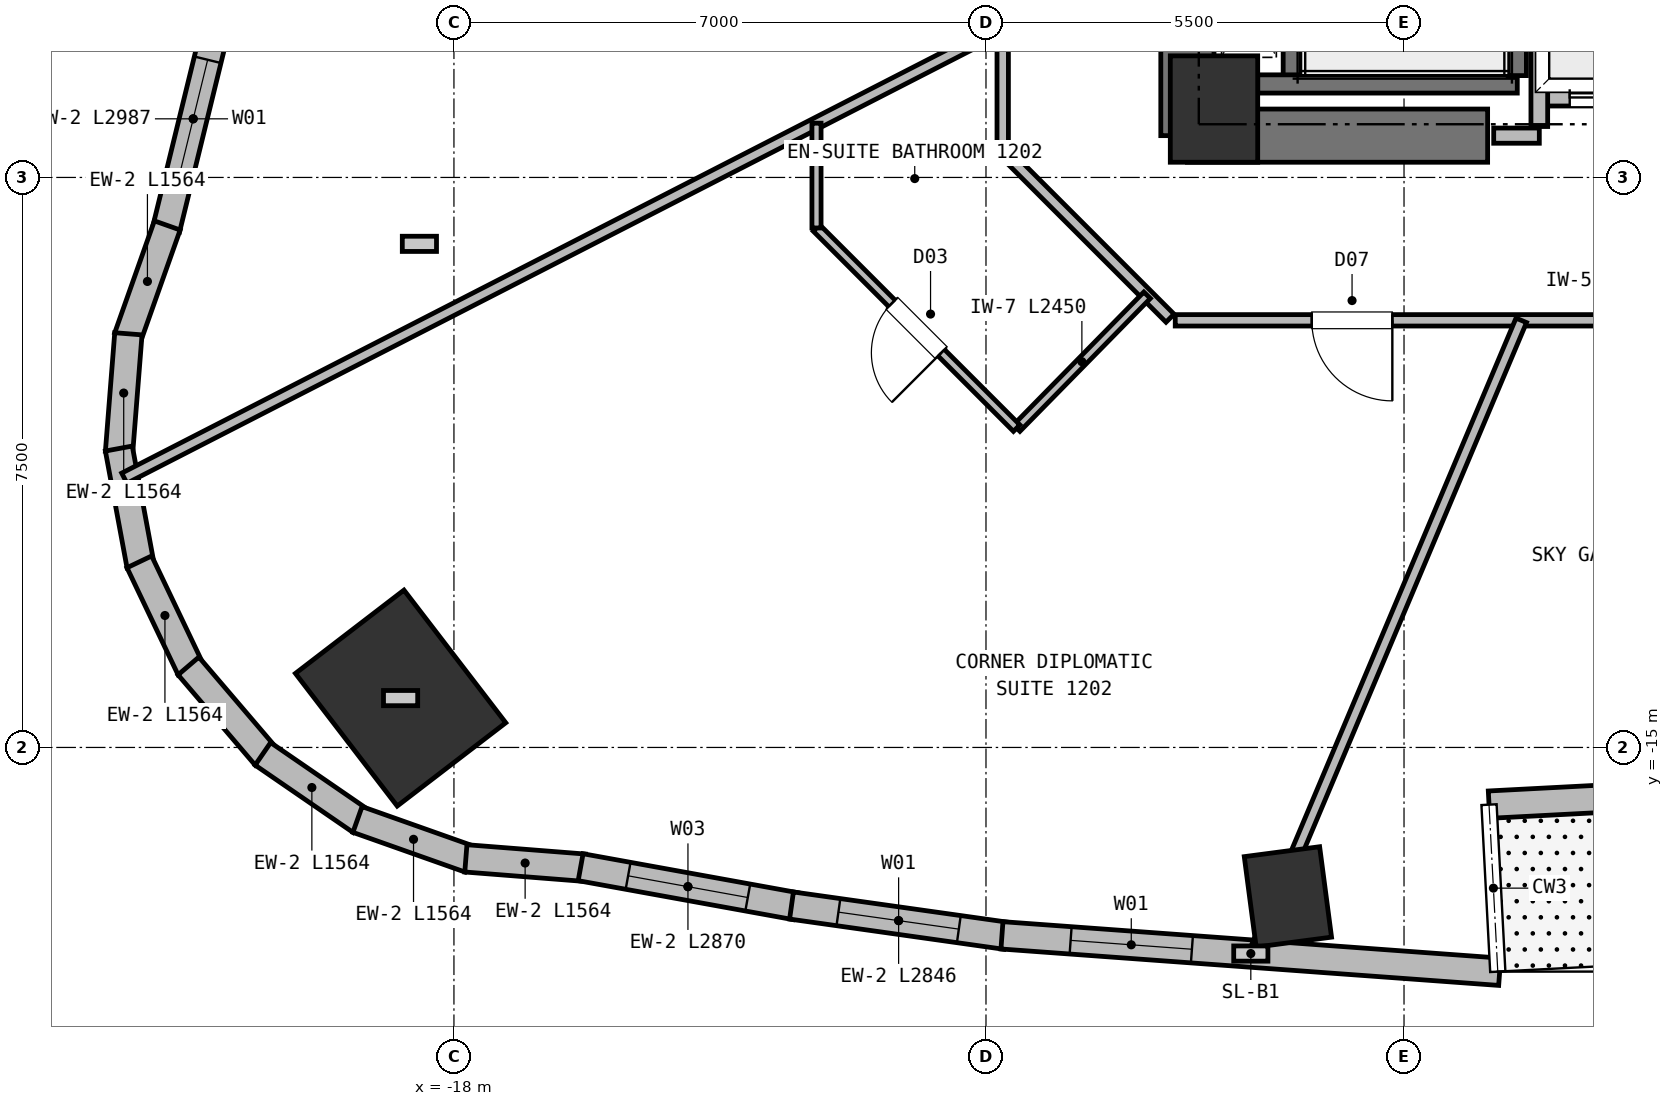
"""IFC4 building model, lengths in metres.
Left out: names, types, materials, properties, quantities, classifications, styles, units other than length and angle.
Written with IfcOpenShell. Run it as: python <this file> out.ifc"""

import sys

from ifc_helpers import new_model, si_unit, direction, frame, frame_2d, origin, origin_2d, place, context, subcontext, project, spatial, rectangle, extrude, element, fill, save


model = new_model("IFC4")
c1 = context("Model", 3, precision=1e-05, world=origin(), true_north=direction((0.0, 1.0)))
c2 = subcontext(c1, "Body", "Model", "MODEL_VIEW")
j1 = project(units=[si_unit("LENGTHUNIT", "METRE"), si_unit("PLANEANGLEUNIT", "RADIAN")], contexts=[c1])
p1 = place(None, origin())
s1 = spatial("IfcSite", under=j1, at=p1, CompositionType="ELEMENT")
p2 = place(p1, origin())
s2 = spatial("IfcBuilding", under=s1, at=p2, CompositionType="ELEMENT")
p3 = place(p2, frame((0.0, 0.0, 41.75)))
s3 = spatial("IfcBuildingStorey", under=s2, at=p3, CompositionType="ELEMENT", Elevation=41.75)
p4 = place(p3, frame((-8.0, -6.6, 0.0), z_axis=(0.0, 0.0, 1.0), x_axis=(1.0, 0.0, 0.0)))
e1 = element("IfcColumn", 1, at=p4, inside=s3, PredefinedType="COLUMN", context=c2, shape_type="SweptSolid", body=[
    extrude(rectangle(XDim=1.15, YDim=1.4, at=origin_2d()), origin(), (0.0, 0.0, 1.0), 3.75),
])
p5 = place(p3, frame((-8.35, -6.95, 0.0), z_axis=(0.0, 0.0, 1.0), x_axis=(1.0, 0.0, 0.0)))
e2 = element("IfcWall", 2, at=p5, inside=s3, PredefinedType="SHEAR", context=c2, shape_type="SweptSolid", body=[
    extrude(rectangle(XDim=3.95, YDim=0.7, at=frame_2d((1.975, 0.0))), origin(), (0.0, 0.0, 1.0), 3.5),
])
p6 = place(p3, frame((-8.35, -6.95, 0.0), z_axis=(0.0, 0.0, 1.0), x_axis=(0.0, 1.0, 0.0)))
e3 = element("IfcWall", 3, at=p6, inside=s3, PredefinedType="SHEAR", context=c2, shape_type="SweptSolid", body=[
    extrude(rectangle(XDim=8.1, YDim=0.7, at=frame_2d((4.05, 0.0))), origin(), (0.0, 0.0, 1.0), 3.5),
])
p7 = place(p3, frame((-18.702, -14.351, 0.0), z_axis=(0.0, 0.0, 1.0), x_axis=(0.793353340291, 0.608761429009, 0.0)))
e4 = element("IfcColumn", 4, at=p7, inside=s3, PredefinedType="COLUMN", context=c2, shape_type="SweptSolid", body=[
    extrude(rectangle(XDim=1.8, YDim=2.2, at=origin_2d()), origin(), (0.0, 0.0, 1.0), 3.75),
])
p8 = place(p3, frame((-7.028, -16.966, 0.0), z_axis=(0.0, 0.0, 1.0), x_axis=(0.991444861374, 0.13052619222, 0.0)))
e5 = element("IfcColumn", 5, at=p8, inside=s3, PredefinedType="COLUMN", context=c2, shape_type="SweptSolid", body=[
    extrude(rectangle(XDim=1.0, YDim=1.2, at=origin_2d()), origin(), (0.0, 0.0, 1.0), 3.75),
])
p9 = place(p3, frame((6.004, -15.208, 0.0), z_axis=(0.0, 0.0, 1.0), x_axis=(-0.998630058509, -0.052325961458, 0.0)))
e6 = element("IfcWall", 6, at=p9, inside=s3, PredefinedType="SOLIDWALL", context=c2, shape_type="SweptSolid", body=[
    extrude(rectangle(XDim=10.4, YDim=0.36, at=frame_2d((5.2, 0.0))), origin(), (0.0, 0.0, 1.0), 3.5),
])
p10 = place(p9, frame((5.0, 0.0, 0.0)))
e7 = element("IfcOpeningElement", 7, at=p10, cuts=e6, PredefinedType="OPENING", context=c2, shape_type="SweptSolid", body=[
    extrude(rectangle(XDim=1.65, YDim=2.25, at=frame_2d((0.825, 1.125))), frame((0.0, 0.19, 0.0), z_axis=(0.0, -1.0, 0.0), x_axis=(1.0, 0.0, 0.0)), (0.0, 0.0, 1.0), 0.38),
])
p11 = place(p3, frame((-21.786, -8.179, 0.0), z_axis=(0.0, 0.0, 1.0), x_axis=(0.237936398685, 0.971280737058, 0.0)))
e8 = element("IfcWall", 8, at=p11, inside=s3, PredefinedType="SOLIDWALL", context=c2, shape_type="SweptSolid", body=[
    extrude(rectangle(XDim=2.987, YDim=0.36, at=frame_2d((1.493, 0.0))), origin(), (0.0, 0.0, 1.0), 3.5),
])
p12 = place(p11, frame((0.694, 0.0, 0.72)))
e9 = element("IfcOpeningElement", 9, at=p12, cuts=e8, PredefinedType="OPENING", context=c2, shape_type="SweptSolid", body=[
    extrude(rectangle(XDim=1.6, YDim=1.88, at=frame_2d((0.8, 0.94))), frame((0.0, 0.19, 0.0), z_axis=(0.0, -1.0, 0.0), x_axis=(1.0, 0.0, 0.0)), (0.0, 0.0, 1.0), 0.38),
])
p13 = place(p3, frame((-22.294, -9.606, 0.0), z_axis=(0.0, 0.0, 1.0), x_axis=(0.333734446931, 0.942667130503, 0.0)))
e10 = element("IfcWall", 10, at=p13, inside=s3, PredefinedType="SOLIDWALL", context=c2, shape_type="SweptSolid", body=[
    extrude(rectangle(XDim=1.564, YDim=0.36, at=frame_2d((0.782, 0.0))), origin(), (0.0, 0.0, 1.0), 3.5),
])
p14 = place(p3, frame((-22.406, -11.117, 0.0), z_axis=(0.0, 0.0, 1.0), x_axis=(0.078510627557, 0.99691327675, 0.0)))
e11 = element("IfcWall", 11, at=p14, inside=s3, PredefinedType="SOLIDWALL", context=c2, shape_type="SweptSolid", body=[
    extrude(rectangle(XDim=1.564, YDim=0.36, at=frame_2d((0.782, 0.0))), origin(), (0.0, 0.0, 1.0), 3.5),
])
for number, where, z_axis, x_axis in (
    (12, (-22.124, -12.605, 0.0), (0.0, 0.0, 1.0), (-0.182, 0.983, 0.0)),
    (13, (-21.466, -13.969, 0.0), (0.0, 0.0, 1.0), (-0.431, 0.903, 0.0)),
):
    element("IfcWall", number, at=place(p3, frame(where, z_axis=z_axis, x_axis=x_axis)), inside=s3, PredefinedType="SOLIDWALL", context=c2, shape_type="SweptSolid", body=[
        extrude(rectangle(XDim=1.564, YDim=0.36, at=frame_2d((0.782, 0.0))), origin(), (0.0, 0.0, 1.0), 3.5),
    ])
for number, where, z_axis, x_axis in (
    (14, (-20.477, -15.117, 0.0), (0.0, 0.0, 1.0), (-0.649, 0.76, 0.0)),
    (15, (-19.225, -15.97, 0.0), (0.0, 0.0, 1.0), (-0.824, 0.566, 0.0)),
):
    element("IfcWall", number, at=place(p3, frame(where, z_axis=z_axis, x_axis=x_axis)), inside=s3, PredefinedType="SOLIDWALL", context=c2, shape_type="SweptSolid", body=[
        extrude(rectangle(XDim=1.564, YDim=0.36, at=frame_2d((0.782, 0.0))), origin(), (0.0, 0.0, 1.0), 3.5),
    ])
p15 = place(p3, frame((-17.795, -16.47, 0.0), z_axis=(0.0, 0.0, 1.0), x_axis=(-0.942667130503, 0.333734446931, 0.0)))
e16 = element("IfcWall", 16, at=p15, inside=s3, PredefinedType="SOLIDWALL", context=c2, shape_type="SweptSolid", body=[
    extrude(rectangle(XDim=1.564, YDim=0.36, at=frame_2d((0.782, 0.0))), origin(), (0.0, 0.0, 1.0), 3.5),
])
p16 = place(p3, frame((-16.284, -16.582, 0.0), z_axis=(0.0, 0.0, 1.0), x_axis=(-0.99691327675, 0.078510627557, 0.0)))
e17 = element("IfcWall", 17, at=p16, inside=s3, PredefinedType="SOLIDWALL", context=c2, shape_type="SweptSolid", body=[
    extrude(rectangle(XDim=1.564, YDim=0.36, at=frame_2d((0.782, 0.0))), origin(), (0.0, 0.0, 1.0), 3.5),
])
p17 = place(p3, frame((-13.509, -17.088, 0.0), z_axis=(0.0, 0.0, 1.0), x_axis=(-0.983946038972, 0.17846622199, 0.0)))
e18 = element("IfcWall", 18, at=p17, inside=s3, PredefinedType="SOLIDWALL", context=c2, shape_type="SweptSolid", body=[
    extrude(rectangle(XDim=2.87, YDim=0.36, at=frame_2d((1.435, 0.0))), origin(), (0.0, 0.0, 1.0), 3.5),
])
p18 = place(p17, frame((0.635, 0.0, 0.72)))
e19 = element("IfcOpeningElement", 19, at=p18, cuts=e18, PredefinedType="OPENING", context=c2, shape_type="SweptSolid", body=[
    extrude(rectangle(XDim=1.6, YDim=1.88, at=frame_2d((0.8, 0.94))), frame((0.0, 0.19, 0.0), z_axis=(0.0, -1.0, 0.0), x_axis=(1.0, 0.0, 0.0)), (0.0, 0.0, 1.0), 0.38),
])
p19 = place(p3, frame((-10.74, -17.478, 0.0), z_axis=(0.0, 0.0, 1.0), x_axis=(-0.99018993195, 0.139727945179, 0.0)))
e20 = element("IfcWall", 20, at=p19, inside=s3, PredefinedType="SOLIDWALL", context=c2, shape_type="SweptSolid", body=[
    extrude(rectangle(XDim=2.846, YDim=0.36, at=frame_2d((1.423, 0.0))), origin(), (0.0, 0.0, 1.0), 3.5),
])
p20 = place(p19, frame((0.623, 0.0, 0.72)))
e21 = element("IfcOpeningElement", 21, at=p20, cuts=e20, PredefinedType="OPENING", context=c2, shape_type="SweptSolid", body=[
    extrude(rectangle(XDim=1.6, YDim=1.88, at=frame_2d((0.8, 0.94))), frame((0.0, 0.19, 0.0), z_axis=(0.0, -1.0, 0.0), x_axis=(1.0, 0.0, 0.0)), (0.0, 0.0, 1.0), 0.38),
])
p21 = place(p3, frame((-4.241, -17.951, 0.0), z_axis=(0.0, 0.0, 1.0), x_axis=(-0.997332601372, 0.072990973697, 0.0)))
e22 = element("IfcWall", 22, at=p21, inside=s3, PredefinedType="SOLIDWALL", context=c2, shape_type="SweptSolid", body=[
    extrude(rectangle(XDim=6.566, YDim=0.36, at=frame_2d((3.283, 0.0))), origin(), (0.0, 0.0, 1.0), 2.93),
])
p22 = place(p21, frame((4.06, 0.0, 0.72)))
e23 = element("IfcOpeningElement", 23, at=p22, cuts=e22, PredefinedType="OPENING", context=c2, shape_type="SweptSolid", body=[
    extrude(rectangle(XDim=1.6, YDim=1.88, at=frame_2d((0.8, 0.94))), frame((0.0, 0.19, 0.0), z_axis=(0.0, -1.0, 0.0), x_axis=(1.0, 0.0, 0.0)), (0.0, 0.0, 1.0), 0.38),
])
p23 = place(p3, frame((-6.97, -6.16, 0.0), z_axis=(0.0, 0.0, 1.0), x_axis=(0.0, 1.0, 0.0)))
e24 = element("IfcWall", 24, at=p23, inside=s3, PredefinedType="SHEAR", context=c2, shape_type="SweptSolid", body=[
    extrude(rectangle(XDim=7.22, YDim=0.24, at=frame_2d((3.61, 0.0))), origin(), (0.0, 0.0, 1.0), 3.5),
])
p24 = place(p3, frame((-7.425, -6.27, 0.0), z_axis=(0.0, 0.0, 1.0), x_axis=(1.0, 0.0, 0.0)))
e25 = element("IfcWall", 25, at=p24, inside=s3, PredefinedType="SHEAR", context=c2, shape_type="SweptSolid", body=[
    extrude(rectangle(XDim=3.415, YDim=0.24, at=frame_2d((1.708, 0.0))), origin(), (0.0, 0.0, 1.0), 3.5),
])
p25 = place(p3, frame((-4.01, -6.16, 0.0), z_axis=(0.0, 0.0, 1.0), x_axis=(0.0, 1.0, 0.0)))
e26 = element("IfcWall", 26, at=p25, inside=s3, PredefinedType="SHEAR", context=c2, shape_type="SweptSolid", body=[
    extrude(rectangle(XDim=7.22, YDim=0.24, at=frame_2d((3.61, 0.0))), origin(), (0.0, 0.0, 1.0), 3.5),
])
p26 = place(p3, frame((-3.72, -6.45, 0.0), z_axis=(0.0, 0.0, 1.0), x_axis=(1.0, 0.0, 0.0)))
e27 = element("IfcWall", 27, at=p26, inside=s3, PredefinedType="PARTITIONING", context=c2, shape_type="SweptSolid", body=[
    extrude(rectangle(XDim=1.86, YDim=0.22, at=frame_2d((0.93, 0.0))), origin(), (0.0, 0.0, 1.0), 3.08),
])
p27 = place(p26, frame((0.4, 0.0, 0.0)))
e28 = element("IfcOpeningElement", 28, at=p27, cuts=e27, PredefinedType="OPENING", context=c2, shape_type="SweptSolid", body=[
    extrude(rectangle(XDim=1.06, YDim=2.15, at=frame_2d((0.53, 1.075))), frame((0.0, 0.12, 0.0), z_axis=(0.0, -1.0, 0.0), x_axis=(1.0, 0.0, 0.0)), (0.0, 0.0, 1.0), 0.24),
])
p28 = place(p3, frame((-3.72, -6.83, 0.0), z_axis=(0.0, 0.0, 1.0), x_axis=(0.0, 1.0, 0.0)))
e29 = element("IfcWall", 29, at=p28, inside=s3, PredefinedType="PARTITIONING", context=c2, shape_type="SweptSolid", body=[
    extrude(rectangle(XDim=2.36, YDim=0.22, at=frame_2d((1.18, 0.0))), origin(), (0.0, 0.0, 1.0), 3.5),
])
p29 = place(p3, frame((-4.32, -6.95, 0.0), z_axis=(0.0, 0.0, 1.0), x_axis=(1.0, 0.0, 0.0)))
e30 = element("IfcWall", 30, at=p29, inside=s3, PredefinedType="PARTITIONING", context=c2, shape_type="SweptSolid", body=[
    extrude(rectangle(XDim=0.6, YDim=0.2, at=frame_2d((0.3, 0.0))), origin(), (0.0, 0.0, 1.0), 3.5),
])
p30 = place(p3, frame((8.51, -9.38, 0.0), z_axis=(0.0, 0.0, 1.0), x_axis=(-1.0, 0.0, 0.0)))
e31 = element("IfcWall", 31, at=p30, inside=s3, PredefinedType="PARTITIONING", context=c2, shape_type="SweptSolid", body=[
    extrude(rectangle(XDim=17.02, YDim=0.15, at=frame_2d((8.51, 0.0))), origin(), (0.0, 0.0, 1.0), 3.5),
])
p31 = place(p30, frame((7.448, 0.0, 0.0)))
e32 = element("IfcOpeningElement", 32, at=p31, cuts=e31, PredefinedType="OPENING", context=c2, shape_type="SweptSolid", body=[
    extrude(rectangle(XDim=1.0, YDim=2.15, at=frame_2d((0.5, 1.075))), frame((0.0, 0.085, 0.0), z_axis=(0.0, -1.0, 0.0), x_axis=(1.0, 0.0, 0.0)), (0.0, 0.0, 1.0), 0.17),
])
p32 = place(p30, frame((1.309, 0.0, 0.0)))
e33 = element("IfcOpeningElement", 33, at=p32, cuts=e31, PredefinedType="OPENING", context=c2, shape_type="SweptSolid", body=[
    extrude(rectangle(XDim=1.0, YDim=2.15, at=frame_2d((0.5, 1.075))), frame((0.0, 0.085, 0.0), z_axis=(0.0, -1.0, 0.0), x_axis=(1.0, 0.0, 0.0)), (0.0, 0.0, 1.0), 0.17),
])
p33 = place(p30, frame((14.164, 0.0, 0.0)))
e34 = element("IfcOpeningElement", 34, at=p33, cuts=e31, PredefinedType="OPENING", context=c2, shape_type="SweptSolid", body=[
    extrude(rectangle(XDim=1.06, YDim=2.15, at=frame_2d((0.53, 1.075))), frame((0.0, 0.085, 0.0), z_axis=(0.0, -1.0, 0.0), x_axis=(1.0, 0.0, 0.0)), (0.0, 0.0, 1.0), 0.17),
])
p34 = place(p3, frame((-10.78, -7.11, 0.0), z_axis=(0.0, 0.0, 1.0), x_axis=(0.0, 1.0, 0.0)))
e35 = element("IfcWall", 35, at=p34, inside=s3, PredefinedType="PARTITIONING", context=c2, shape_type="SweptSolid", body=[
    extrude(rectangle(XDim=14.22, YDim=0.15, at=frame_2d((7.11, 0.0))), origin(), (0.0, 0.0, 1.0), 3.12),
])
p35 = place(p34, frame((11.344, 0.0, 0.0)))
e36 = element("IfcOpeningElement", 36, at=p35, cuts=e35, PredefinedType="OPENING", context=c2, shape_type="SweptSolid", body=[
    extrude(rectangle(XDim=1.0, YDim=2.15, at=frame_2d((0.5, 1.075))), frame((0.0, 0.085, 0.0), z_axis=(0.0, -1.0, 0.0), x_axis=(1.0, 0.0, 0.0)), (0.0, 0.0, 1.0), 0.17),
])
p36 = place(p34, frame((9.272, 0.0, 0.0)))
e37 = element("IfcOpeningElement", 37, at=p36, cuts=e35, PredefinedType="OPENING", context=c2, shape_type="SweptSolid", body=[
    extrude(rectangle(XDim=0.95, YDim=2.1, at=frame_2d((0.475, 1.05))), frame((0.0, 0.085, 0.0), z_axis=(0.0, -1.0, 0.0), x_axis=(1.0, 0.0, 0.0)), (0.0, 0.0, 1.0), 0.17),
])
p37 = place(p34, frame((3.035, 0.0, 0.0)))
e38 = element("IfcOpeningElement", 38, at=p37, cuts=e35, PredefinedType="OPENING", context=c2, shape_type="SweptSolid", body=[
    extrude(rectangle(XDim=1.06, YDim=2.15, at=frame_2d((0.53, 1.075))), frame((0.0, 0.085, 0.0), z_axis=(0.0, -1.0, 0.0), x_axis=(1.0, 0.0, 0.0)), (0.0, 0.0, 1.0), 0.17),
])
p38 = place(p3, frame((-8.578, -9.352, 0.0), z_axis=(0.0, 0.0, 1.0), x_axis=(-0.707067066127, 0.707146494016, 0.0)))
e39 = element("IfcWall", 39, at=p38, inside=s3, PredefinedType="PARTITIONING", context=c2, shape_type="SweptSolid", body=[
    extrude(rectangle(XDim=3.074, YDim=0.15, at=frame_2d((1.537, 0.0))), origin(), (0.0, 0.0, 1.0), 3.5),
])
p39 = place(p3, frame((-10.78, -5.53, 0.0), z_axis=(0.0, 0.0, 1.0), x_axis=(-0.889778319353, -0.456392969281, 0.0)))
e40 = element("IfcWall", 40, at=p39, inside=s3, PredefinedType="PARTITIONING", context=c2, shape_type="SweptSolid", body=[
    extrude(rectangle(XDim=12.988, YDim=0.15, at=frame_2d((6.494, 0.0))), origin(), (0.0, 0.0, 1.0), 3.5),
])
p40 = place(p3, frame((-10.596, -10.799, 0.0), z_axis=(0.0, 0.0, 1.0), x_axis=(0.700399102338, 0.713751425529, 0.0)))
e41 = element("IfcWall", 41, at=p40, inside=s3, PredefinedType="PARTITIONING", context=c2, shape_type="SweptSolid", body=[
    extrude(rectangle(XDim=2.45, YDim=0.12, at=frame_2d((1.225, 0.0))), origin(), (0.0, 0.0, 1.0), 3.5),
])
p41 = place(p3, frame((-10.596, -10.799, 0.0), z_axis=(0.0, 0.0, 1.0), x_axis=(-0.707074006069, 0.707139554785, 0.0)))
e42 = element("IfcWall", 42, at=p41, inside=s3, PredefinedType="PARTITIONING", context=c2, shape_type="SweptSolid", body=[
    extrude(rectangle(XDim=3.725, YDim=0.12, at=frame_2d((1.862, 0.0))), origin(), (0.0, 0.0, 1.0), 3.5),
])
p42 = place(p41, frame((1.402, 0.0, 0.0)))
e43 = element("IfcOpeningElement", 43, at=p42, cuts=e42, PredefinedType="OPENING", context=c2, shape_type="SweptSolid", body=[
    extrude(rectangle(XDim=0.92, YDim=2.1, at=frame_2d((0.46, 1.05))), frame((0.0, 0.07, 0.0), z_axis=(0.0, -1.0, 0.0), x_axis=(1.0, 0.0, 0.0)), (0.0, 0.0, 1.0), 0.14),
])
p43 = place(p3, frame((-13.23, -6.786, 0.0), z_axis=(0.0, 0.0, 1.0), x_axis=(0.0, -1.0, 0.0)))
e44 = element("IfcWall", 44, at=p43, inside=s3, PredefinedType="PARTITIONING", context=c2, shape_type="SweptSolid", body=[
    extrude(rectangle(XDim=1.379, YDim=0.12, at=frame_2d((0.689, 0.0))), origin(), (0.0, 0.0, 1.0), 3.12),
])
p44 = place(p3, frame((-3.958, -9.38, 0.0), z_axis=(0.0, 0.0, 1.0), x_axis=(-0.388727710855, -0.921352683185, 0.0)))
e45 = element("IfcWall", 45, at=p44, inside=s3, PredefinedType="PARTITIONING", context=c2, shape_type="SweptSolid", body=[
    extrude(rectangle(XDim=9.046, YDim=0.15, at=frame_2d((4.523, 0.0))), origin(), (0.0, 0.0, 1.0), 3.5),
])
p45 = place(p12, origin())
e46 = element("IfcWindow", 46, at=p45, inside=s3, PartitioningType="SINGLE_PANEL", PredefinedType="WINDOW", context=c2, shape_type="SweptSolid", body=[
    extrude(rectangle(XDim=1.6, YDim=1.88, at=frame_2d((0.8, 0.94))), frame((0.0, 0.03, 0.0), z_axis=(0.0, -1.0, 0.0), x_axis=(1.0, 0.0, 0.0)), (0.0, 0.0, 1.0), 0.06),
])
fill(e9, e46)
p46 = place(p18, origin())
e47 = element("IfcWindow", 47, at=p46, inside=s3, PartitioningType="SINGLE_PANEL", PredefinedType="WINDOW", context=c2, shape_type="SweptSolid", body=[
    extrude(rectangle(XDim=1.6, YDim=1.88, at=frame_2d((0.8, 0.94))), frame((0.0, 0.03, 0.0), z_axis=(0.0, -1.0, 0.0), x_axis=(1.0, 0.0, 0.0)), (0.0, 0.0, 1.0), 0.06),
])
fill(e19, e47)
p47 = place(p20, origin())
e48 = element("IfcWindow", 48, at=p47, inside=s3, PartitioningType="SINGLE_PANEL", PredefinedType="WINDOW", context=c2, shape_type="SweptSolid", body=[
    extrude(rectangle(XDim=1.6, YDim=1.88, at=frame_2d((0.8, 0.94))), frame((0.0, 0.03, 0.0), z_axis=(0.0, -1.0, 0.0), x_axis=(1.0, 0.0, 0.0)), (0.0, 0.0, 1.0), 0.06),
])
fill(e21, e48)
p48 = place(p22, origin())
e49 = element("IfcWindow", 49, at=p48, inside=s3, PartitioningType="SINGLE_PANEL", PredefinedType="WINDOW", context=c2, shape_type="SweptSolid", body=[
    extrude(rectangle(XDim=1.6, YDim=1.88, at=frame_2d((0.8, 0.94))), frame((0.0, 0.03, 0.0), z_axis=(0.0, -1.0, 0.0), x_axis=(1.0, 0.0, 0.0)), (0.0, 0.0, 1.0), 0.06),
])
fill(e23, e49)
p49 = place(p27, origin())
e50 = element("IfcDoor", 50, at=p49, inside=s3, OperationType="DOUBLE_DOOR_SLIDING", PredefinedType="DOOR", context=c2, shape_type="SweptSolid", body=[
    extrude(rectangle(XDim=1.06, YDim=2.15, at=frame_2d((0.53, 1.075))), frame((0.0, 0.025, 0.0), z_axis=(0.0, -1.0, 0.0), x_axis=(1.0, 0.0, 0.0)), (0.0, 0.0, 1.0), 0.05),
])
fill(e28, e50)
p50 = place(p42, origin())
e51 = element("IfcDoor", 51, at=p50, inside=s3, OperationType="SINGLE_SWING_LEFT", PredefinedType="DOOR", context=c2, shape_type="SweptSolid", body=[
    extrude(rectangle(XDim=0.92, YDim=2.1, at=frame_2d((0.46, 1.05))), frame((0.0, 0.025, 0.0), z_axis=(0.0, -1.0, 0.0), x_axis=(1.0, 0.0, 0.0)), (0.0, 0.0, 1.0), 0.05),
])
fill(e43, e51)
p51 = place(p33, origin())
e52 = element("IfcDoor", 52, at=p51, inside=s3, OperationType="SINGLE_SWING_LEFT", PredefinedType="DOOR", context=c2, shape_type="SweptSolid", body=[
    extrude(rectangle(XDim=1.06, YDim=2.15, at=frame_2d((0.53, 1.075))), frame((0.0, 0.025, 0.0), z_axis=(0.0, -1.0, 0.0), x_axis=(1.0, 0.0, 0.0)), (0.0, 0.0, 1.0), 0.05),
])
fill(e34, e52)
save(model, sys.argv[1])
